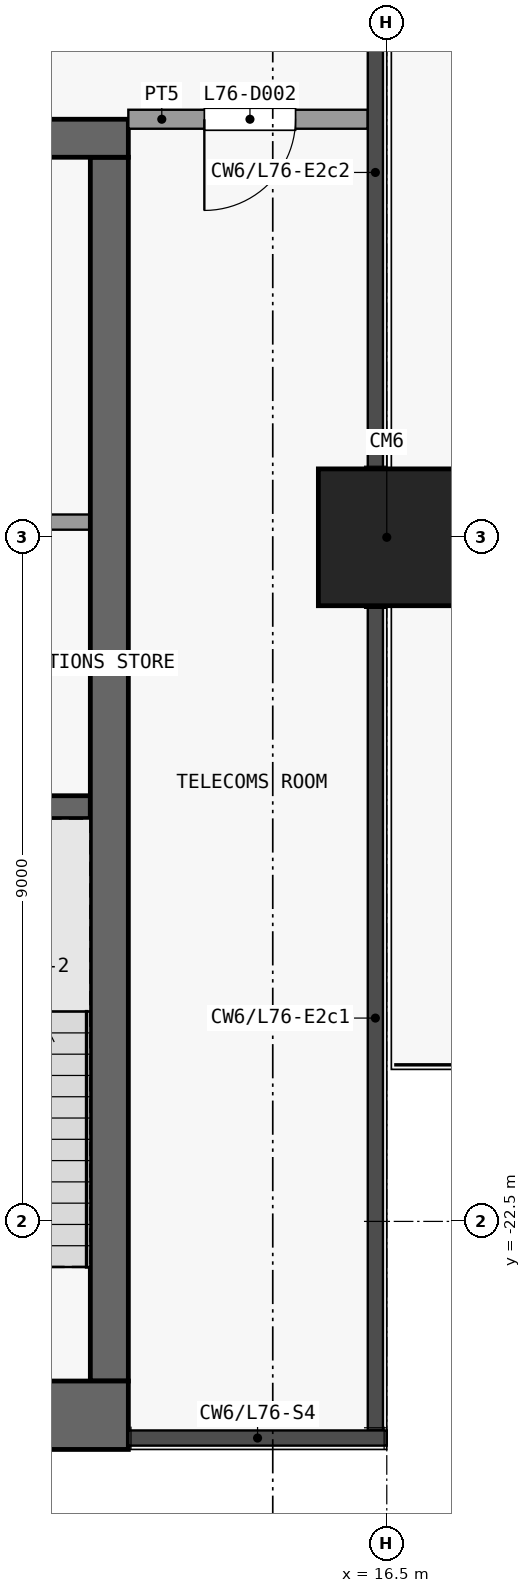
"""IFC4 building model, lengths in metres.
Left out: names, types, materials, properties, quantities, classifications, styles, units other than length and angle.
Written with IfcOpenShell. Run it as: python <this file> out.ifc"""

import sys

from ifc_helpers import new_model, si_unit, direction, frame, frame_2d, origin, origin_2d, place, context, subcontext, project, spatial, rectangle, extrude, element, fill, save


model = new_model("IFC4")
c1 = context("Model", 3, precision=1e-05, world=origin(), true_north=direction((0.0, 1.0)))
c2 = subcontext(c1, "Body", "Model", "MODEL_VIEW")
j1 = project(units=[si_unit("LENGTHUNIT", "METRE"), si_unit("PLANEANGLEUNIT", "RADIAN")], contexts=[c1])
p1 = place(None, origin())
s1 = spatial("IfcSite", under=j1, at=p1, CompositionType="ELEMENT")
p2 = place(p1, origin())
s2 = spatial("IfcBuilding", under=s1, at=p2, CompositionType="ELEMENT")
p3 = place(p2, frame((0.0, 0.0, 298.7)))
s3 = spatial("IfcBuildingStorey", under=s2, at=p3, CompositionType="ELEMENT", Elevation=298.7)
p4 = place(p3, frame((16.5, -13.5, 0.0), z_axis=(0.0, 0.0, 1.0), x_axis=(1.0, 0.0, 0.0)))
e1 = element("IfcColumn", 1, at=p4, inside=s3, PredefinedType="COLUMN", context=c2, shape_type="SweptSolid", body=[
    extrude(rectangle(XDim=1.8, YDim=1.8, at=origin_2d()), origin(), (0.0, 0.0, 1.0), 4.5),
])
p5 = place(p3, frame((-13.1, -25.05, 0.0), z_axis=(0.0, 0.0, 1.0), x_axis=(1.0, 0.0, 0.0)))
e2 = element("IfcWall", 2, at=p5, inside=s3, PredefinedType="SHEAR", context=c2, shape_type="SweptSolid", body=[
    extrude(rectangle(XDim=26.2, YDim=0.9, at=frame_2d((13.1, 0.0))), origin(), (0.0, 0.0, 1.0), 4.2),
])
p6 = place(p3, frame((-13.1, -8.25, 0.0), z_axis=(0.0, 0.0, 1.0), x_axis=(1.0, 0.0, 0.0)))
e3 = element("IfcWall", 3, at=p6, inside=s3, PredefinedType="SHEAR", context=c2, shape_type="SweptSolid", body=[
    extrude(rectangle(XDim=26.2, YDim=0.5, at=frame_2d((13.1, 0.0))), origin(), (0.0, 0.0, 1.0), 4.2),
])
p7 = place(p6, frame((7.4, 0.0, 0.0)))
e4 = element("IfcOpeningElement", 4, at=p7, cuts=e3, PredefinedType="OPENING", context=c2, shape_type="SweptSolid", body=[
    extrude(rectangle(XDim=1.8, YDim=2.1, at=frame_2d((0.9, 1.05))), frame((0.0, 0.26, 0.0), z_axis=(0.0, -1.0, 0.0), x_axis=(1.0, 0.0, 0.0)), (0.0, 0.0, 1.0), 0.52),
])
p8 = place(p6, frame((17.0, 0.0, 0.0)))
e5 = element("IfcOpeningElement", 5, at=p8, cuts=e3, PredefinedType="OPENING", context=c2, shape_type="SweptSolid", body=[
    extrude(rectangle(XDim=1.8, YDim=2.1, at=frame_2d((0.9, 1.05))), frame((0.0, 0.26, 0.0), z_axis=(0.0, -1.0, 0.0), x_axis=(1.0, 0.0, 0.0)), (0.0, 0.0, 1.0), 0.52),
])
p9 = place(p6, frame((2.325, 0.0, 0.0)))
e6 = element("IfcOpeningElement", 6, at=p9, cuts=e3, PredefinedType="OPENING", context=c2, shape_type="SweptSolid", body=[
    extrude(rectangle(XDim=0.9, YDim=2.1, at=frame_2d((0.45, 1.05))), frame((0.0, 0.26, 0.0), z_axis=(0.0, -1.0, 0.0), x_axis=(1.0, 0.0, 0.0)), (0.0, 0.0, 1.0), 0.52),
])
p10 = place(p6, frame((22.975, 0.0, 0.0)))
e7 = element("IfcOpeningElement", 7, at=p10, cuts=e3, PredefinedType="OPENING", context=c2, shape_type="SweptSolid", body=[
    extrude(rectangle(XDim=0.9, YDim=2.1, at=frame_2d((0.45, 1.05))), frame((0.0, 0.26, 0.0), z_axis=(0.0, -1.0, 0.0), x_axis=(1.0, 0.0, 0.0)), (0.0, 0.0, 1.0), 0.52),
])
p11 = place(p3, frame((12.85, -24.6, 0.0), z_axis=(0.0, 0.0, 1.0), x_axis=(0.0, 1.0, 0.0)))
e8 = element("IfcWall", 8, at=p11, inside=s3, PredefinedType="SHEAR", context=c2, shape_type="SweptSolid", body=[
    extrude(rectangle(XDim=16.1, YDim=0.5, at=frame_2d((8.05, 0.0))), origin(), (0.0, 0.0, 1.0), 4.2),
])
p12 = place(p3, frame((9.75, -17.05, 0.0), z_axis=(0.0, 0.0, 1.0), x_axis=(1.0, 0.0, 0.0)))
e9 = element("IfcWall", 9, at=p12, inside=s3, PredefinedType="SHEAR", context=c2, shape_type="SweptSolid", body=[
    extrude(rectangle(XDim=2.85, YDim=0.3, at=frame_2d((1.425, 0.0))), origin(), (0.0, 0.0, 1.0), 4.2),
])
p13 = place(p3, frame((11.15, -13.3, 0.0), z_axis=(0.0, 0.0, 1.0), x_axis=(1.0, 0.0, 0.0)))
e10 = element("IfcWall", 10, at=p13, inside=s3, PredefinedType="PARTITIONING", context=c2, shape_type="SweptSolid", body=[
    extrude(rectangle(XDim=1.45, YDim=0.2, at=frame_2d((0.725, 0.0))), origin(), (0.0, 0.0, 1.0), 4.2),
])
p14 = place(p3, frame((13.1, -8.0, 0.0), z_axis=(0.0, 0.0, 1.0), x_axis=(1.0, 0.0, 0.0)))
e11 = element("IfcWall", 11, at=p14, inside=s3, PredefinedType="PARTITIONING", context=c2, shape_type="SweptSolid", body=[
    extrude(rectangle(XDim=3.15, YDim=0.25, at=frame_2d((1.575, 0.0))), origin(), (0.0, 0.0, 1.0), 4.2),
])
p15 = place(p14, frame((1.0, 0.0, 0.0)))
e12 = element("IfcOpeningElement", 12, at=p15, cuts=e11, PredefinedType="OPENING", context=c2, shape_type="SweptSolid", body=[
    extrude(rectangle(XDim=1.2, YDim=2.1, at=frame_2d((0.6, 1.05))), frame((0.0, 0.135, 0.0), z_axis=(0.0, -1.0, 0.0), x_axis=(1.0, 0.0, 0.0)), (0.0, 0.0, 1.0), 0.27),
])
p16 = place(p15, origin())
e13 = element("IfcDoor", 13, at=p16, inside=s3, OperationType="SINGLE_SWING_LEFT", PredefinedType="DOOR", context=c2, shape_type="SweptSolid", body=[
    extrude(rectangle(XDim=1.2, YDim=2.1, at=frame_2d((0.6, 1.05))), frame((0.0, 0.025, 0.0), z_axis=(0.0, -1.0, 0.0), x_axis=(1.0, 0.0, 0.0)), (0.0, 0.0, 1.0), 0.05),
])
fill(e12, e13)
save(model, sys.argv[1])
